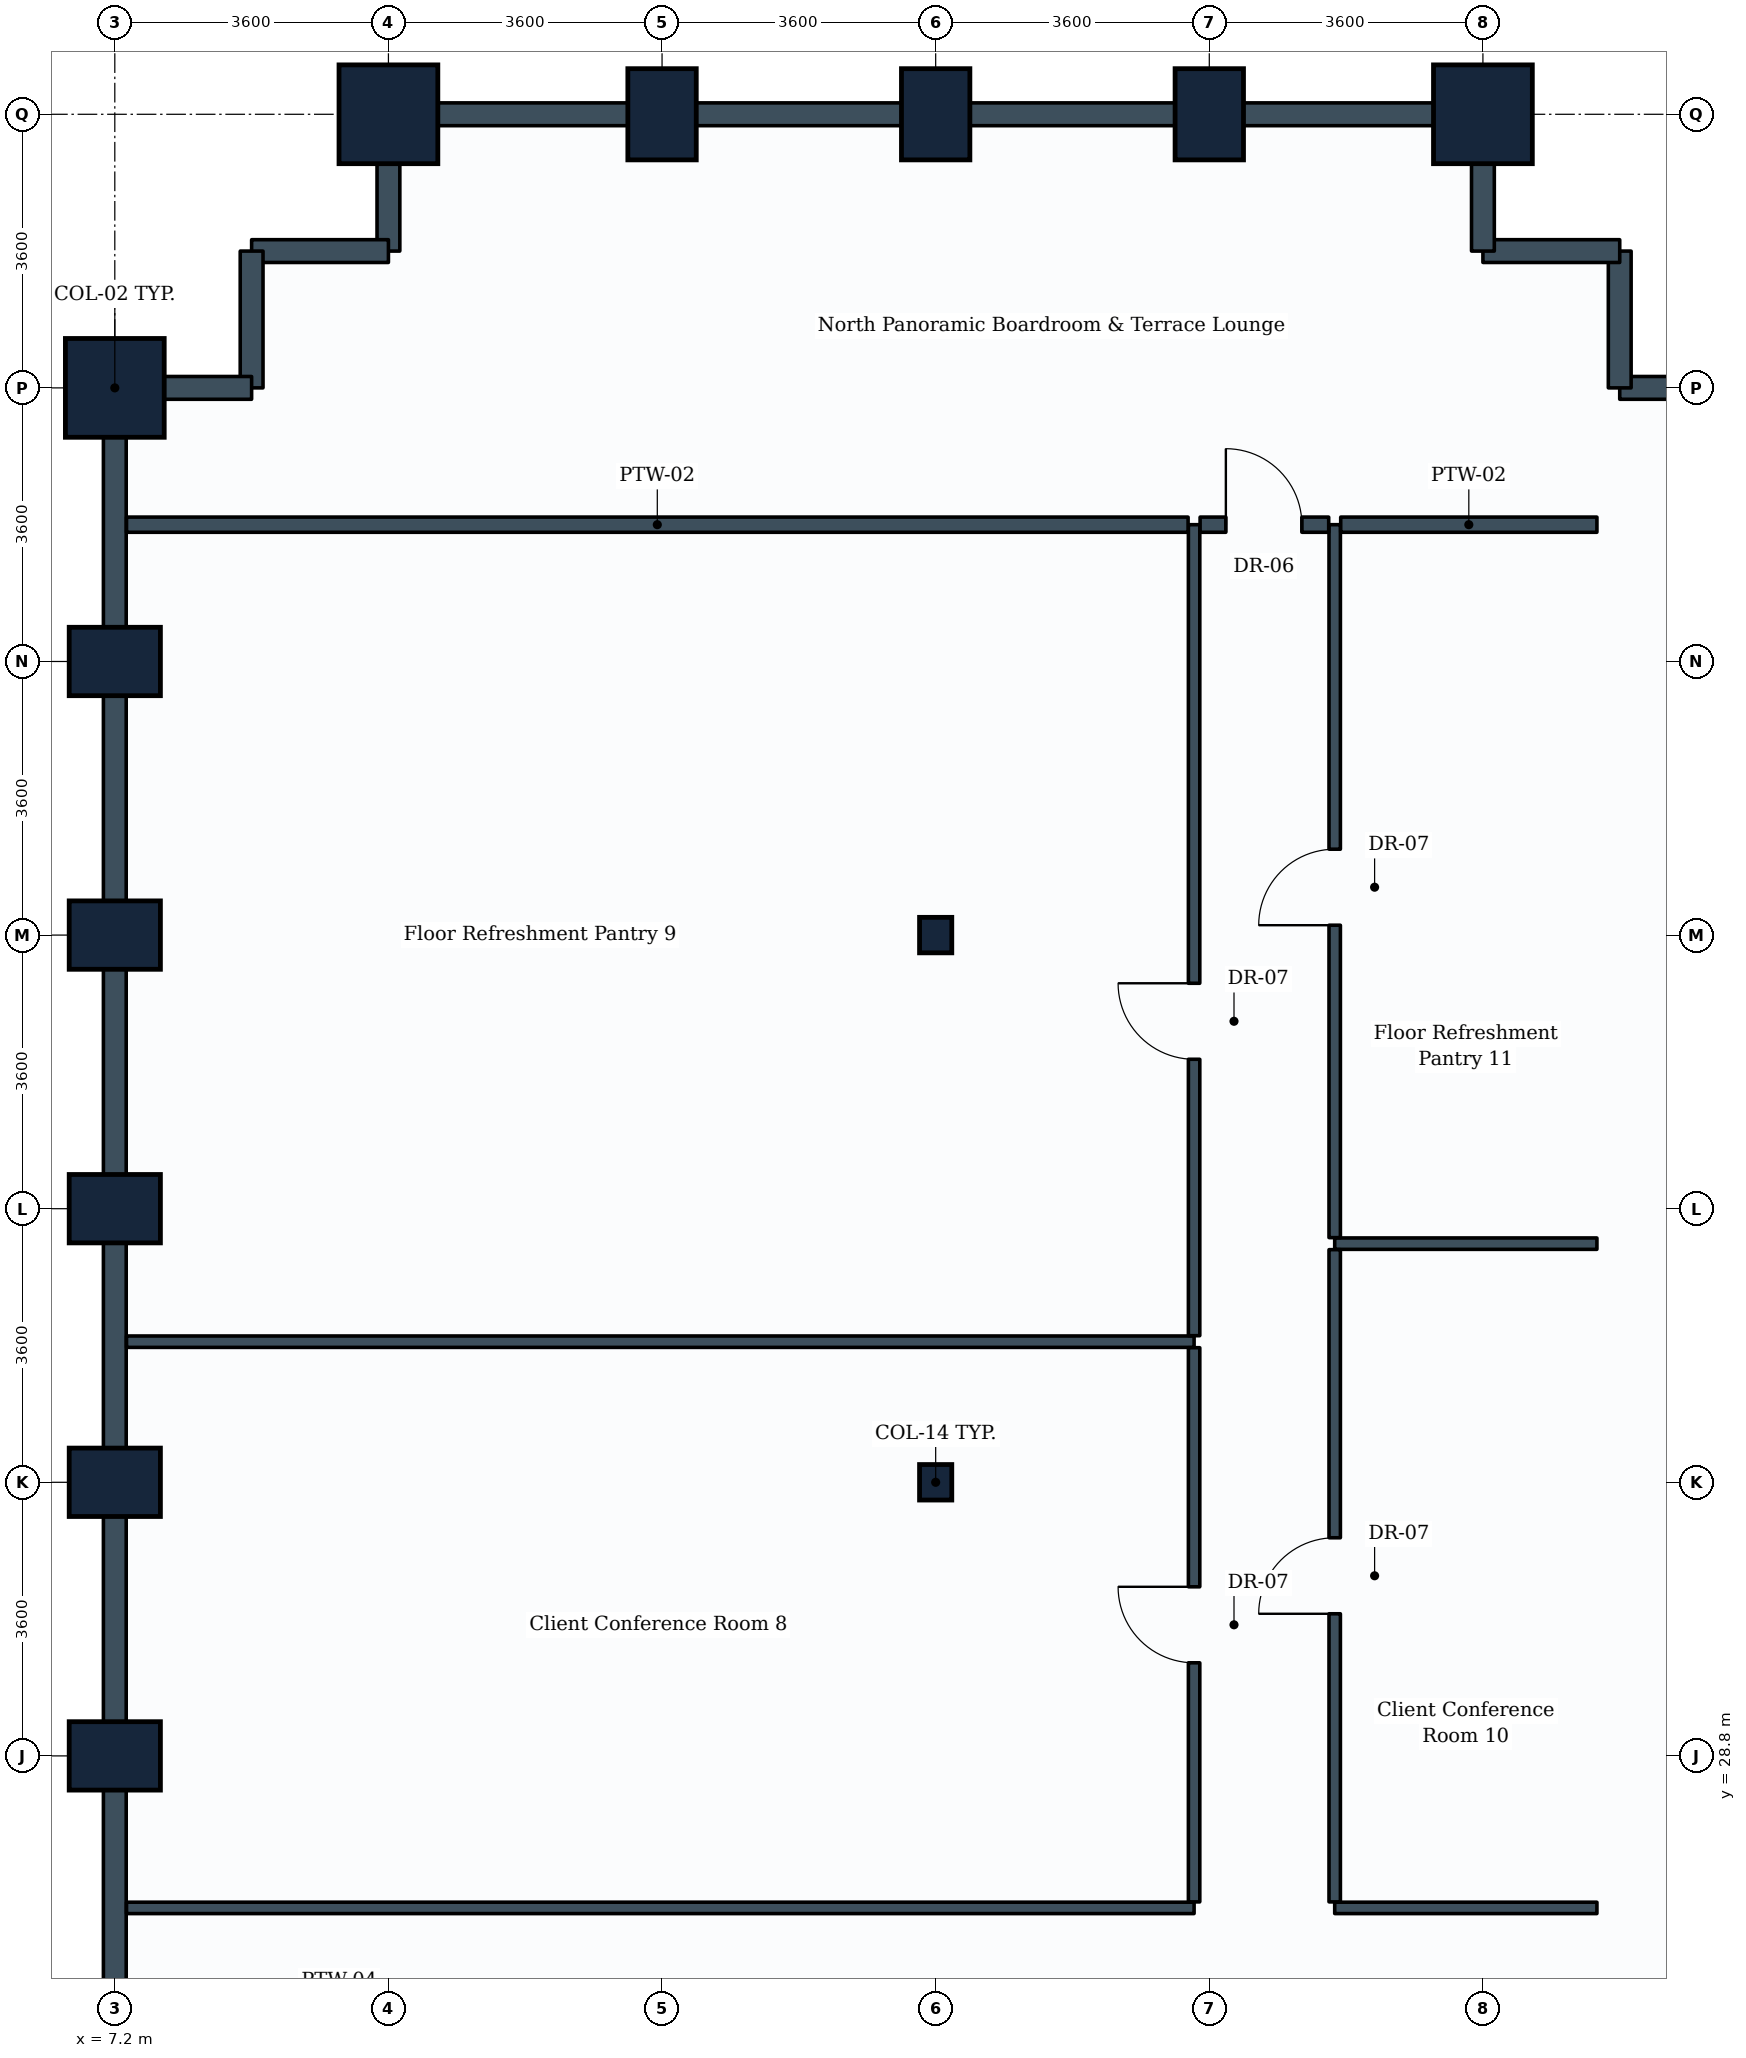
"""IFC4 building model, lengths in metres.
Left out: names, types, materials, properties, quantities, classifications, styles, units other than length and angle.
Written with IfcOpenShell. Run it as: python <this file> out.ifc"""

import sys

from ifc_helpers import new_model, si_unit, direction, frame, frame_2d, origin, origin_2d, place, context, subcontext, project, spatial, rectangle, i_section, extrude, element, fill, save


model = new_model("IFC4")
c1 = context("Model", 3, precision=1e-05, world=origin(), true_north=direction((0.0, 1.0)))
c2 = subcontext(c1, "Body", "Model", "MODEL_VIEW")
j1 = project(units=[si_unit("LENGTHUNIT", "METRE"), si_unit("PLANEANGLEUNIT", "RADIAN")], contexts=[c1])
p1 = place(None, origin())
s1 = spatial("IfcSite", under=j1, at=p1, CompositionType="ELEMENT")
p2 = place(p1, origin())
s2 = spatial("IfcBuilding", under=s1, at=p2, CompositionType="ELEMENT")
p3 = place(p2, frame((0.0, 0.0, 35.7)))
s3 = spatial("IfcBuildingStorey", under=s2, at=p3, CompositionType="ELEMENT", Elevation=35.7)
for number, where, z_axis, x_axis in (
    (1, (7.2, 28.8, 0.0), (0.0, 0.0, 1.0), (0.0, 1.0, 0.0)),
    (2, (7.2, 32.4, 0.0), (0.0, 0.0, 1.0), (0.0, 1.0, 0.0)),
    (3, (7.2, 36.0, 0.0), (0.0, 0.0, 1.0), (0.0, 1.0, 0.0)),
    (4, (7.2, 39.6, 0.0), (0.0, 0.0, 1.0), (0.0, 1.0, 0.0)),
    (5, (7.2, 43.2, 0.0), (0.0, 0.0, 1.0), (0.0, 1.0, 0.0)),
):
    element("IfcColumn", number, at=place(p3, frame(where, z_axis=z_axis, x_axis=x_axis)), inside=s3, PredefinedType="COLUMN", context=c2, shape_type="SweptSolid", body=[
        extrude(rectangle(XDim=0.9, YDim=1.2, at=origin_2d()), origin(), (0.0, 0.0, 1.0), 3.9),
    ])
for number, where, z_axis, x_axis in (
    (6, (7.2, 46.8, 0.0), (0.0, 0.0, 1.0), (0.0, 1.0, 0.0)),
    (7, (10.8, 50.4, 0.0), (0.0, 0.0, 1.0), (1.0, 0.0, 0.0)),
):
    element("IfcColumn", number, at=place(p3, frame(where, z_axis=z_axis, x_axis=x_axis)), inside=s3, PredefinedType="COLUMN", context=c2, shape_type="SweptSolid", body=[
        extrude(rectangle(XDim=1.3, YDim=1.3, at=origin_2d()), origin(), (0.0, 0.0, 1.0), 3.9),
    ])
p4 = place(p3, frame((14.4, 50.4, 0.0), z_axis=(0.0, 0.0, 1.0), x_axis=(1.0, 0.0, 0.0)))
e8 = element("IfcColumn", 8, at=p4, inside=s3, PredefinedType="COLUMN", context=c2, shape_type="SweptSolid", body=[
    extrude(rectangle(XDim=0.9, YDim=1.2, at=origin_2d()), origin(), (0.0, 0.0, 1.0), 3.9),
])
for number, where, z_axis, x_axis in (
    (9, (18.0, 32.4, 0.0), (0.0, 0.0, 1.0), (1.0, 0.0, 0.0)),
    (10, (18.0, 39.6, 0.0), (0.0, 0.0, 1.0), (1.0, 0.0, 0.0)),
):
    element("IfcColumn", number, at=place(p3, frame(where, z_axis=z_axis, x_axis=x_axis)), inside=s3, PredefinedType="COLUMN", context=c2, shape_type="SweptSolid", body=[
        extrude(i_section(OverallWidth=0.424, OverallDepth=0.467, WebThickness=0.033, FlangeThickness=0.053, FilletRadius=0.015, at=origin_2d()), origin(), (0.0, 0.0, 1.0), 3.9),
    ])
for number, where, z_axis, x_axis in (
    (11, (18.0, 50.4, 0.0), (0.0, 0.0, 1.0), (1.0, 0.0, 0.0)),
    (12, (21.6, 50.4, 0.0), (0.0, 0.0, 1.0), (1.0, 0.0, 0.0)),
):
    element("IfcColumn", number, at=place(p3, frame(where, z_axis=z_axis, x_axis=x_axis)), inside=s3, PredefinedType="COLUMN", context=c2, shape_type="SweptSolid", body=[
        extrude(rectangle(XDim=0.9, YDim=1.2, at=origin_2d()), origin(), (0.0, 0.0, 1.0), 3.9),
    ])
p5 = place(p3, frame((25.2, 50.4, 0.0), z_axis=(0.0, 0.0, 1.0), x_axis=(1.0, 0.0, 0.0)))
e13 = element("IfcColumn", 13, at=p5, inside=s3, PredefinedType="COLUMN", context=c2, shape_type="SweptSolid", body=[
    extrude(rectangle(XDim=1.3, YDim=1.3, at=origin_2d()), origin(), (0.0, 0.0, 1.0), 3.9),
])
p6 = place(p3, frame((27.0, 46.8, 0.0), z_axis=(0.0, 0.0, 1.0), x_axis=(1.0, 0.0, 0.0)))
e14 = element("IfcWall", 14, at=p6, inside=s3, PredefinedType="STANDARD", context=c2, shape_type="SweptSolid", body=[
    extrude(rectangle(XDim=1.8, YDim=0.3, at=frame_2d((0.9, 0.0))), origin(), (0.0, 0.0, 1.0), 2.93),
])
for number, where, z_axis, x_axis in (
    (15, (27.0, 46.8, 0.0), (0.0, 0.0, 1.0), (0.0, 1.0, 0.0)),
    (16, (25.2, 48.6, 0.0), (0.0, 0.0, 1.0), (1.0, 0.0, 0.0)),
):
    element("IfcWall", number, at=place(p3, frame(where, z_axis=z_axis, x_axis=x_axis)), inside=s3, PredefinedType="STANDARD", context=c2, shape_type="SweptSolid", body=[
        extrude(rectangle(XDim=1.8, YDim=0.3, at=frame_2d((0.9, 0.0))), origin(), (0.0, 0.0, 1.0), 3.635),
    ])
p7 = place(p3, frame((25.2, 48.6, 0.0), z_axis=(0.0, 0.0, 1.0), x_axis=(0.0, 1.0, 0.0)))
e17 = element("IfcWall", 17, at=p7, inside=s3, PredefinedType="STANDARD", context=c2, shape_type="SweptSolid", body=[
    extrude(rectangle(XDim=1.8, YDim=0.3, at=frame_2d((0.9, 0.0))), origin(), (0.0, 0.0, 1.0), 2.93),
])
p8 = place(p3, frame((21.6, 50.4, 0.0), z_axis=(0.0, 0.0, 1.0), x_axis=(1.0, 0.0, 0.0)))
e18 = element("IfcWall", 18, at=p8, inside=s3, PredefinedType="STANDARD", context=c2, shape_type="SweptSolid", body=[
    extrude(rectangle(XDim=3.6, YDim=0.3, at=frame_2d((1.8, 0.0))), origin(), (0.0, 0.0, 1.0), 2.93),
])
for number, where, z_axis, x_axis in (
    (19, (18.0, 50.4, 0.0), (0.0, 0.0, 1.0), (1.0, 0.0, 0.0)),
    (20, (14.4, 50.4, 0.0), (0.0, 0.0, 1.0), (1.0, 0.0, 0.0)),
):
    element("IfcWall", number, at=place(p3, frame(where, z_axis=z_axis, x_axis=x_axis)), inside=s3, PredefinedType="STANDARD", context=c2, shape_type="SweptSolid", body=[
        extrude(rectangle(XDim=3.6, YDim=0.3, at=frame_2d((1.8, 0.0))), origin(), (0.0, 0.0, 1.0), 2.93),
    ])
p9 = place(p3, frame((10.8, 50.4, 0.0), z_axis=(0.0, 0.0, 1.0), x_axis=(1.0, 0.0, 0.0)))
e21 = element("IfcWall", 21, at=p9, inside=s3, PredefinedType="STANDARD", context=c2, shape_type="SweptSolid", body=[
    extrude(rectangle(XDim=3.6, YDim=0.3, at=frame_2d((1.8, 0.0))), origin(), (0.0, 0.0, 1.0), 2.93),
])
p10 = place(p3, frame((10.8, 48.6, 0.0), z_axis=(0.0, 0.0, 1.0), x_axis=(0.0, 1.0, 0.0)))
e22 = element("IfcWall", 22, at=p10, inside=s3, PredefinedType="STANDARD", context=c2, shape_type="SweptSolid", body=[
    extrude(rectangle(XDim=1.8, YDim=0.3, at=frame_2d((0.9, 0.0))), origin(), (0.0, 0.0, 1.0), 2.93),
])
for number, where, z_axis, x_axis in (
    (23, (9.0, 48.6, 0.0), (0.0, 0.0, 1.0), (1.0, 0.0, 0.0)),
    (24, (9.0, 46.8, 0.0), (0.0, 0.0, 1.0), (0.0, 1.0, 0.0)),
):
    element("IfcWall", number, at=place(p3, frame(where, z_axis=z_axis, x_axis=x_axis)), inside=s3, PredefinedType="STANDARD", context=c2, shape_type="SweptSolid", body=[
        extrude(rectangle(XDim=1.8, YDim=0.3, at=frame_2d((0.9, 0.0))), origin(), (0.0, 0.0, 1.0), 3.635),
    ])
p11 = place(p3, frame((7.2, 46.8, 0.0), z_axis=(0.0, 0.0, 1.0), x_axis=(1.0, 0.0, 0.0)))
e25 = element("IfcWall", 25, at=p11, inside=s3, PredefinedType="STANDARD", context=c2, shape_type="SweptSolid", body=[
    extrude(rectangle(XDim=1.8, YDim=0.3, at=frame_2d((0.9, 0.0))), origin(), (0.0, 0.0, 1.0), 2.93),
])
p12 = place(p3, frame((7.2, 43.2, 0.0), z_axis=(0.0, 0.0, 1.0), x_axis=(0.0, 1.0, 0.0)))
e26 = element("IfcWall", 26, at=p12, inside=s3, PredefinedType="STANDARD", context=c2, shape_type="SweptSolid", body=[
    extrude(rectangle(XDim=3.6, YDim=0.3, at=frame_2d((1.8, 0.0))), origin(), (0.0, 0.0, 1.0), 2.93),
])
p13 = place(p3, frame((7.2, 39.6, 0.0), z_axis=(0.0, 0.0, 1.0), x_axis=(0.0, 1.0, 0.0)))
e27 = element("IfcWall", 27, at=p13, inside=s3, PredefinedType="STANDARD", context=c2, shape_type="SweptSolid", body=[
    extrude(rectangle(XDim=3.6, YDim=0.3, at=frame_2d((1.8, 0.0))), origin(), (0.0, 0.0, 1.0), 2.93),
])
for number, where, z_axis, x_axis in (
    (28, (7.2, 36.0, 0.0), (0.0, 0.0, 1.0), (0.0, 1.0, 0.0)),
    (29, (7.2, 32.4, 0.0), (0.0, 0.0, 1.0), (0.0, 1.0, 0.0)),
):
    element("IfcWall", number, at=place(p3, frame(where, z_axis=z_axis, x_axis=x_axis)), inside=s3, PredefinedType="STANDARD", context=c2, shape_type="SweptSolid", body=[
        extrude(rectangle(XDim=3.6, YDim=0.3, at=frame_2d((1.8, 0.0))), origin(), (0.0, 0.0, 1.0), 2.93),
    ])
p14 = place(p3, frame((7.2, 28.8, 0.0), z_axis=(0.0, 0.0, 1.0), x_axis=(0.0, 1.0, 0.0)))
e30 = element("IfcWall", 30, at=p14, inside=s3, PredefinedType="STANDARD", context=c2, shape_type="SweptSolid", body=[
    extrude(rectangle(XDim=3.6, YDim=0.3, at=frame_2d((1.8, 0.0))), origin(), (0.0, 0.0, 1.0), 2.93),
])
p15 = place(p3, frame((7.2, 25.2, 0.0), z_axis=(0.0, 0.0, 1.0), x_axis=(0.0, 1.0, 0.0)))
e31 = element("IfcWall", 31, at=p15, inside=s3, PredefinedType="STANDARD", context=c2, shape_type="SweptSolid", body=[
    extrude(rectangle(XDim=3.6, YDim=0.3, at=frame_2d((1.8, 0.0))), origin(), (0.0, 0.0, 1.0), 2.93),
])
for number, where, z_axis, x_axis in (
    (32, (7.354, 26.8, 0.0), (0.0, 0.0, 1.0), (1.0, 0.0, 0.0)),
    (33, (7.354, 34.25, 0.0), (0.0, 0.0, 1.0), (1.0, 0.0, 0.0)),
):
    element("IfcWall", number, at=place(p3, frame(where, z_axis=z_axis, x_axis=x_axis)), inside=s3, PredefinedType="PARTITIONING", context=c2, shape_type="SweptSolid", body=[
        extrude(rectangle(XDim=14.046, YDim=0.15, at=frame_2d((7.023, 0.0))), origin(), (0.0, 0.0, 1.0), 2.93),
    ])
p16 = place(p3, frame((21.4, 26.879, 0.0), z_axis=(0.0, 0.0, 1.0), x_axis=(0.0, 1.0, 0.0)))
e34 = element("IfcWall", 34, at=p16, inside=s3, PredefinedType="PARTITIONING", context=c2, shape_type="SweptSolid", body=[
    extrude(rectangle(XDim=7.292, YDim=0.15, at=frame_2d((3.646, 0.0))), origin(), (0.0, 0.0, 1.0), 3.08),
])
p17 = place(p16, frame((3.146, 0.0, 0.0)))
e35 = element("IfcOpeningElement", 35, at=p17, cuts=e34, PredefinedType="OPENING", context=c2, shape_type="SweptSolid", body=[
    extrude(rectangle(XDim=1.0, YDim=2.1, at=frame_2d((0.5, 1.05))), frame((0.0, 0.085, 0.0), z_axis=(0.0, -1.0, 0.0), x_axis=(1.0, 0.0, 0.0)), (0.0, 0.0, 1.0), 0.17),
])
p18 = place(p3, frame((21.4, 34.329, 0.0), z_axis=(0.0, 0.0, 1.0), x_axis=(0.0, 1.0, 0.0)))
e36 = element("IfcWall", 36, at=p18, inside=s3, PredefinedType="PARTITIONING", context=c2, shape_type="SweptSolid", body=[
    extrude(rectangle(XDim=10.671, YDim=0.15, at=frame_2d((5.335, 0.0))), origin(), (0.0, 0.0, 1.0), 3.03),
])
p19 = place(p18, frame((3.637, 0.0, 0.0)))
e37 = element("IfcOpeningElement", 37, at=p19, cuts=e36, PredefinedType="OPENING", context=c2, shape_type="SweptSolid", body=[
    extrude(rectangle(XDim=1.0, YDim=2.1, at=frame_2d((0.5, 1.05))), frame((0.0, 0.085, 0.0), z_axis=(0.0, -1.0, 0.0), x_axis=(1.0, 0.0, 0.0)), (0.0, 0.0, 1.0), 0.17),
])
p20 = place(p3, frame((23.25, 26.8, 0.0), z_axis=(0.0, 0.0, 1.0), x_axis=(1.0, 0.0, 0.0)))
e38 = element("IfcWall", 38, at=p20, inside=s3, PredefinedType="PARTITIONING", context=c2, shape_type="SweptSolid", body=[
    extrude(rectangle(XDim=3.45, YDim=0.15, at=frame_2d((1.725, 0.0))), origin(), (0.0, 0.0, 1.0), 3.635),
])
p21 = place(p3, frame((23.25, 35.54, 0.0), z_axis=(0.0, 0.0, 1.0), x_axis=(1.0, 0.0, 0.0)))
e39 = element("IfcWall", 39, at=p21, inside=s3, PredefinedType="PARTITIONING", context=c2, shape_type="SweptSolid", body=[
    extrude(rectangle(XDim=3.45, YDim=0.15, at=frame_2d((1.725, 0.0))), origin(), (0.0, 0.0, 1.0), 3.03),
])
p22 = place(p3, frame((23.25, 26.879, 0.0), z_axis=(0.0, 0.0, 1.0), x_axis=(0.0, 1.0, 0.0)))
e40 = element("IfcWall", 40, at=p22, inside=s3, PredefinedType="PARTITIONING", context=c2, shape_type="SweptSolid", body=[
    extrude(rectangle(XDim=8.582, YDim=0.15, at=frame_2d((4.291, 0.0))), origin(), (0.0, 0.0, 1.0), 3.08),
])
p23 = place(p22, frame((3.791, 0.0, 0.0)))
e41 = element("IfcOpeningElement", 41, at=p23, cuts=e40, PredefinedType="OPENING", context=c2, shape_type="SweptSolid", body=[
    extrude(rectangle(XDim=1.0, YDim=2.1, at=frame_2d((0.5, 1.05))), frame((0.0, 0.085, 0.0), z_axis=(0.0, -1.0, 0.0), x_axis=(1.0, 0.0, 0.0)), (0.0, 0.0, 1.0), 0.17),
])
p24 = place(p3, frame((23.25, 35.619, 0.0), z_axis=(0.0, 0.0, 1.0), x_axis=(0.0, 1.0, 0.0)))
e42 = element("IfcWall", 42, at=p24, inside=s3, PredefinedType="PARTITIONING", context=c2, shape_type="SweptSolid", body=[
    extrude(rectangle(XDim=9.381, YDim=0.15, at=frame_2d((4.69, 0.0))), origin(), (0.0, 0.0, 1.0), 3.08),
])
p25 = place(p24, frame((4.111, 0.0, 0.0)))
e43 = element("IfcOpeningElement", 43, at=p25, cuts=e42, PredefinedType="OPENING", context=c2, shape_type="SweptSolid", body=[
    extrude(rectangle(XDim=1.0, YDim=2.1, at=frame_2d((0.5, 1.05))), frame((0.0, 0.085, 0.0), z_axis=(0.0, -1.0, 0.0), x_axis=(1.0, 0.0, 0.0)), (0.0, 0.0, 1.0), 0.17),
])
p26 = place(p3, frame((7.354, 45.0, 0.0), z_axis=(0.0, 0.0, 1.0), x_axis=(1.0, 0.0, 0.0)))
e44 = element("IfcWall", 44, at=p26, inside=s3, PredefinedType="PARTITIONING", context=c2, shape_type="SweptSolid", body=[
    extrude(rectangle(XDim=13.967, YDim=0.2, at=frame_2d((6.983, 0.0))), origin(), (0.0, 0.0, 1.0), 2.93),
])
p27 = place(p3, frame((23.329, 45.0, 0.0), z_axis=(0.0, 0.0, 1.0), x_axis=(1.0, 0.0, 0.0)))
e45 = element("IfcWall", 45, at=p27, inside=s3, PredefinedType="PARTITIONING", context=c2, shape_type="SweptSolid", body=[
    extrude(rectangle(XDim=3.371, YDim=0.2, at=frame_2d((1.686, 0.0))), origin(), (0.0, 0.0, 1.0), 3.635),
])
p28 = place(p3, frame((21.479, 45.0, 0.0), z_axis=(0.0, 0.0, 1.0), x_axis=(1.0, 0.0, 0.0)))
e46 = element("IfcWall", 46, at=p28, inside=s3, PredefinedType="PARTITIONING", context=c2, shape_type="SweptSolid", body=[
    extrude(rectangle(XDim=1.692, YDim=0.2, at=frame_2d((0.846, 0.0))), origin(), (0.0, 0.0, 1.0), 3.635),
])
p29 = place(p28, frame((0.339, 0.0, 0.0)))
e47 = element("IfcOpeningElement", 47, at=p29, cuts=e46, PredefinedType="OPENING", context=c2, shape_type="SweptSolid", body=[
    extrude(rectangle(XDim=1.0, YDim=2.1, at=frame_2d((0.5, 1.05))), frame((0.0, 0.11, 0.0), z_axis=(0.0, -1.0, 0.0), x_axis=(1.0, 0.0, 0.0)), (0.0, 0.0, 1.0), 0.22),
])
p30 = place(p17, origin())
e48 = element("IfcDoor", 48, at=p30, inside=s3, OperationType="SINGLE_SWING_RIGHT", PredefinedType="DOOR", context=c2, shape_type="SweptSolid", body=[
    extrude(rectangle(XDim=1.0, YDim=2.1, at=frame_2d((0.5, 1.05))), frame((0.0, 0.025, 0.0), z_axis=(0.0, -1.0, 0.0), x_axis=(1.0, 0.0, 0.0)), (0.0, 0.0, 1.0), 0.05),
])
fill(e35, e48)
p31 = place(p19, origin())
e49 = element("IfcDoor", 49, at=p31, inside=s3, OperationType="SINGLE_SWING_RIGHT", PredefinedType="DOOR", context=c2, shape_type="SweptSolid", body=[
    extrude(rectangle(XDim=1.0, YDim=2.1, at=frame_2d((0.5, 1.05))), frame((0.0, 0.025, 0.0), z_axis=(0.0, -1.0, 0.0), x_axis=(1.0, 0.0, 0.0)), (0.0, 0.0, 1.0), 0.05),
])
fill(e37, e49)
p32 = place(p23, origin())
e50 = element("IfcDoor", 50, at=p32, inside=s3, OperationType="SINGLE_SWING_LEFT", PredefinedType="DOOR", context=c2, shape_type="SweptSolid", body=[
    extrude(rectangle(XDim=1.0, YDim=2.1, at=frame_2d((0.5, 1.05))), frame((0.0, 0.025, 0.0), z_axis=(0.0, -1.0, 0.0), x_axis=(1.0, 0.0, 0.0)), (0.0, 0.0, 1.0), 0.05),
])
fill(e41, e50)
p33 = place(p25, origin())
e51 = element("IfcDoor", 51, at=p33, inside=s3, OperationType="SINGLE_SWING_LEFT", PredefinedType="DOOR", context=c2, shape_type="SweptSolid", body=[
    extrude(rectangle(XDim=1.0, YDim=2.1, at=frame_2d((0.5, 1.05))), frame((0.0, 0.025, 0.0), z_axis=(0.0, -1.0, 0.0), x_axis=(1.0, 0.0, 0.0)), (0.0, 0.0, 1.0), 0.05),
])
fill(e43, e51)
p34 = place(p29, origin())
e52 = element("IfcDoor", 52, at=p34, inside=s3, OperationType="SINGLE_SWING_LEFT", PredefinedType="DOOR", context=c2, shape_type="SweptSolid", body=[
    extrude(rectangle(XDim=1.0, YDim=2.1, at=frame_2d((0.5, 1.05))), frame((0.0, 0.025, 0.0), z_axis=(0.0, -1.0, 0.0), x_axis=(1.0, 0.0, 0.0)), (0.0, 0.0, 1.0), 0.05),
])
fill(e47, e52)
save(model, sys.argv[1])
